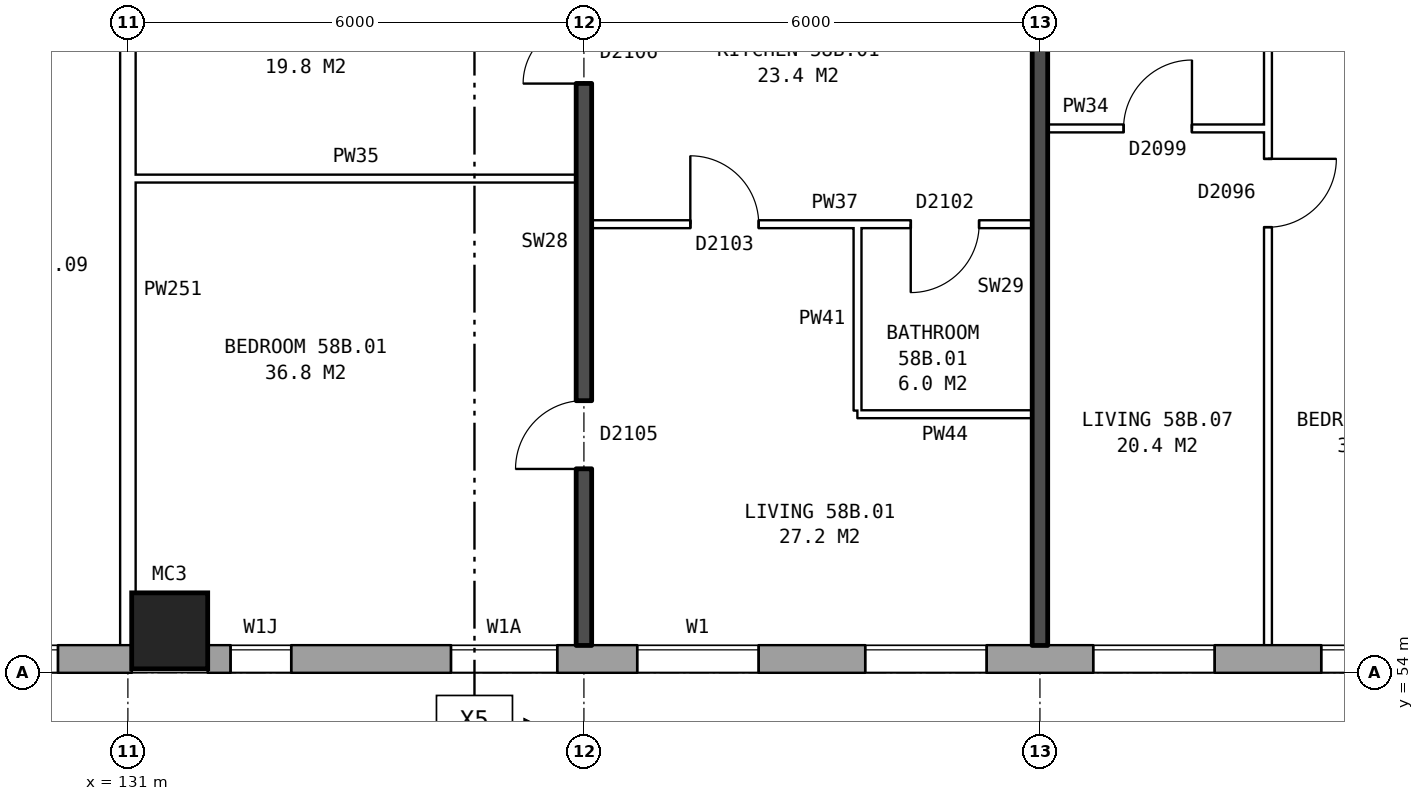
"""IFC4 building model, lengths in metres.
Left out: names, types, materials, properties, quantities, classifications, styles, units other than length and angle.
Written with IfcOpenShell. Run it as: python <this file> out.ifc"""

import sys

from ifc_helpers import new_model, si_unit, direction, frame, frame_2d, origin, origin_2d, place, context, subcontext, project, spatial, rectangle, hollow_rectangle, extrude, element, fill, save


model = new_model("IFC4")
c1 = context("Model", 3, precision=1e-05, world=origin(), true_north=direction((0.0, 1.0)))
c2 = subcontext(c1, "Body", "Model", "MODEL_VIEW")
j1 = project(units=[si_unit("LENGTHUNIT", "METRE"), si_unit("PLANEANGLEUNIT", "RADIAN")], contexts=[c1])
p1 = place(None, origin())
s1 = spatial("IfcSite", under=j1, at=p1, CompositionType="ELEMENT")
p2 = place(p1, origin())
s2 = spatial("IfcBuilding", under=s1, at=p2, CompositionType="ELEMENT")
p3 = place(p2, frame((0.0, 0.0, 205.9)))
s3 = spatial("IfcBuildingStorey", under=s2, at=p3, CompositionType="ELEMENT", Elevation=205.9)
p4 = place(p3, frame((131.55, 54.55, 0.0), z_axis=(0.0, 0.0, 1.0), x_axis=(1.0, 0.0, 0.0)))
e1 = element("IfcColumn", 1, at=p4, inside=s3, PredefinedType="COLUMN", context=c2, shape_type="SweptSolid", body=[
    extrude(hollow_rectangle(XDim=1.0, YDim=1.0, WallThickness=0.055, at=origin_2d()), origin(), (0.0, 0.0, 1.0), 3.1),
])
p5 = place(p3, frame((75.95, 54.18, 0.0), z_axis=(0.0, 0.0, 1.0), x_axis=(1.0, 0.0, 0.0)))
e2 = element("IfcWall", 2, at=p5, inside=s3, PredefinedType="STANDARD", context=c2, shape_type="SweptSolid", body=[
    extrude(rectangle(XDim=55.1, YDim=0.36, at=frame_2d((27.55, 0.0))), origin(), (0.0, 0.0, 1.0), 2.85),
])
p6 = place(p5, frame((0.969, 0.0, 0.8)))
e3 = element("IfcOpeningElement", 3, at=p6, cuts=e2, PredefinedType="OPENING", context=c2, shape_type="SweptSolid", body=[
    extrude(rectangle(XDim=1.6, YDim=1.8, at=frame_2d((0.8, 0.9))), frame((0.0, 0.19, 0.0), z_axis=(0.0, -1.0, 0.0), x_axis=(1.0, 0.0, 0.0)), (0.0, 0.0, 1.0), 0.38),
])
p7 = place(p5, frame((4.406, 0.0, 0.8)))
e4 = element("IfcOpeningElement", 4, at=p7, cuts=e2, PredefinedType="OPENING", context=c2, shape_type="SweptSolid", body=[
    extrude(rectangle(XDim=1.6, YDim=1.8, at=frame_2d((0.8, 0.9))), frame((0.0, 0.19, 0.0), z_axis=(0.0, -1.0, 0.0), x_axis=(1.0, 0.0, 0.0)), (0.0, 0.0, 1.0), 0.38),
])
p8 = place(p5, frame((7.844, 0.0, 0.8)))
e5 = element("IfcOpeningElement", 5, at=p8, cuts=e2, PredefinedType="OPENING", context=c2, shape_type="SweptSolid", body=[
    extrude(rectangle(XDim=1.6, YDim=1.8, at=frame_2d((0.8, 0.9))), frame((0.0, 0.19, 0.0), z_axis=(0.0, -1.0, 0.0), x_axis=(1.0, 0.0, 0.0)), (0.0, 0.0, 1.0), 0.38),
])
p9 = place(p5, frame((11.281, 0.0, 0.8)))
e6 = element("IfcOpeningElement", 6, at=p9, cuts=e2, PredefinedType="OPENING", context=c2, shape_type="SweptSolid", body=[
    extrude(rectangle(XDim=1.6, YDim=1.8, at=frame_2d((0.8, 0.9))), frame((0.0, 0.19, 0.0), z_axis=(0.0, -1.0, 0.0), x_axis=(1.0, 0.0, 0.0)), (0.0, 0.0, 1.0), 0.38),
])
p10 = place(p5, frame((14.719, 0.0, 0.8)))
e7 = element("IfcOpeningElement", 7, at=p10, cuts=e2, PredefinedType="OPENING", context=c2, shape_type="SweptSolid", body=[
    extrude(rectangle(XDim=1.6, YDim=1.8, at=frame_2d((0.8, 0.9))), frame((0.0, 0.19, 0.0), z_axis=(0.0, -1.0, 0.0), x_axis=(1.0, 0.0, 0.0)), (0.0, 0.0, 1.0), 0.38),
])
p11 = place(p5, frame((18.156, 0.0, 0.8)))
e8 = element("IfcOpeningElement", 8, at=p11, cuts=e2, PredefinedType="OPENING", context=c2, shape_type="SweptSolid", body=[
    extrude(rectangle(XDim=1.6, YDim=1.8, at=frame_2d((0.8, 0.9))), frame((0.0, 0.19, 0.0), z_axis=(0.0, -1.0, 0.0), x_axis=(1.0, 0.0, 0.0)), (0.0, 0.0, 1.0), 0.38),
])
p12 = place(p5, frame((21.594, 0.0, 0.8)))
e9 = element("IfcOpeningElement", 9, at=p12, cuts=e2, PredefinedType="OPENING", context=c2, shape_type="SweptSolid", body=[
    extrude(rectangle(XDim=1.6, YDim=1.8, at=frame_2d((0.8, 0.9))), frame((0.0, 0.19, 0.0), z_axis=(0.0, -1.0, 0.0), x_axis=(1.0, 0.0, 0.0)), (0.0, 0.0, 1.0), 0.38),
])
p13 = place(p5, frame((25.031, 0.0, 0.8)))
e10 = element("IfcOpeningElement", 10, at=p13, cuts=e2, PredefinedType="OPENING", context=c2, shape_type="SweptSolid", body=[
    extrude(rectangle(XDim=1.6, YDim=1.8, at=frame_2d((0.8, 0.9))), frame((0.0, 0.19, 0.0), z_axis=(0.0, -1.0, 0.0), x_axis=(1.0, 0.0, 0.0)), (0.0, 0.0, 1.0), 0.38),
])
p14 = place(p5, frame((28.469, 0.0, 0.8)))
e11 = element("IfcOpeningElement", 11, at=p14, cuts=e2, PredefinedType="OPENING", context=c2, shape_type="SweptSolid", body=[
    extrude(rectangle(XDim=1.6, YDim=1.8, at=frame_2d((0.8, 0.9))), frame((0.0, 0.19, 0.0), z_axis=(0.0, -1.0, 0.0), x_axis=(1.0, 0.0, 0.0)), (0.0, 0.0, 1.0), 0.38),
])
p15 = place(p5, frame((31.906, 0.0, 0.8)))
e12 = element("IfcOpeningElement", 12, at=p15, cuts=e2, PredefinedType="OPENING", context=c2, shape_type="SweptSolid", body=[
    extrude(rectangle(XDim=1.6, YDim=1.8, at=frame_2d((0.8, 0.9))), frame((0.0, 0.19, 0.0), z_axis=(0.0, -1.0, 0.0), x_axis=(1.0, 0.0, 0.0)), (0.0, 0.0, 1.0), 0.38),
])
p16 = place(p5, frame((35.344, 0.0, 0.8)))
e13 = element("IfcOpeningElement", 13, at=p16, cuts=e2, PredefinedType="OPENING", context=c2, shape_type="SweptSolid", body=[
    extrude(rectangle(XDim=1.6, YDim=1.8, at=frame_2d((0.8, 0.9))), frame((0.0, 0.19, 0.0), z_axis=(0.0, -1.0, 0.0), x_axis=(1.0, 0.0, 0.0)), (0.0, 0.0, 1.0), 0.38),
])
p17 = place(p5, frame((38.781, 0.0, 0.8)))
e14 = element("IfcOpeningElement", 14, at=p17, cuts=e2, PredefinedType="OPENING", context=c2, shape_type="SweptSolid", body=[
    extrude(rectangle(XDim=1.6, YDim=1.8, at=frame_2d((0.8, 0.9))), frame((0.0, 0.19, 0.0), z_axis=(0.0, -1.0, 0.0), x_axis=(1.0, 0.0, 0.0)), (0.0, 0.0, 1.0), 0.38),
])
p18 = place(p5, frame((42.219, 0.0, 0.8)))
e15 = element("IfcOpeningElement", 15, at=p18, cuts=e2, PredefinedType="OPENING", context=c2, shape_type="SweptSolid", body=[
    extrude(rectangle(XDim=1.6, YDim=1.8, at=frame_2d((0.8, 0.9))), frame((0.0, 0.19, 0.0), z_axis=(0.0, -1.0, 0.0), x_axis=(1.0, 0.0, 0.0)), (0.0, 0.0, 1.0), 0.38),
])
p19 = place(p5, frame((45.656, 0.0, 0.8)))
e16 = element("IfcOpeningElement", 16, at=p19, cuts=e2, PredefinedType="OPENING", context=c2, shape_type="SweptSolid", body=[
    extrude(rectangle(XDim=1.6, YDim=1.8, at=frame_2d((0.8, 0.9))), frame((0.0, 0.19, 0.0), z_axis=(0.0, -1.0, 0.0), x_axis=(1.0, 0.0, 0.0)), (0.0, 0.0, 1.0), 0.38),
])
p20 = place(p5, frame((49.094, 0.0, 0.8)))
e17 = element("IfcOpeningElement", 17, at=p20, cuts=e2, PredefinedType="OPENING", context=c2, shape_type="SweptSolid", body=[
    extrude(rectangle(XDim=1.6, YDim=1.8, at=frame_2d((0.8, 0.9))), frame((0.0, 0.19, 0.0), z_axis=(0.0, -1.0, 0.0), x_axis=(1.0, 0.0, 0.0)), (0.0, 0.0, 1.0), 0.38),
])
p21 = place(p5, frame((52.531, 0.0, 0.8)))
e18 = element("IfcOpeningElement", 18, at=p21, cuts=e2, PredefinedType="OPENING", context=c2, shape_type="SweptSolid", body=[
    extrude(rectangle(XDim=1.6, YDim=1.8, at=frame_2d((0.8, 0.9))), frame((0.0, 0.19, 0.0), z_axis=(0.0, -1.0, 0.0), x_axis=(1.0, 0.0, 0.0)), (0.0, 0.0, 1.0), 0.38),
])
p22 = place(p3, frame((132.05, 54.18, 0.0), z_axis=(0.0, 0.0, 1.0), x_axis=(1.0, 0.0, 0.0)))
e19 = element("IfcWall", 19, at=p22, inside=s3, PredefinedType="STANDARD", context=c2, shape_type="SweptSolid", body=[
    extrude(rectangle(XDim=33.875, YDim=0.36, at=frame_2d((16.938, 0.0))), origin(), (0.0, 0.0, 1.0), 2.85),
])
p23 = place(p22, frame((0.3, 0.0, 0.9)))
e20 = element("IfcOpeningElement", 20, at=p23, cuts=e19, PredefinedType="OPENING", context=c2, shape_type="SweptSolid", body=[
    extrude(rectangle(XDim=0.8, YDim=1.5, at=frame_2d((0.4, 0.75))), frame((0.0, 0.19, 0.0), z_axis=(0.0, -1.0, 0.0), x_axis=(1.0, 0.0, 0.0)), (0.0, 0.0, 1.0), 0.38),
])
p24 = place(p22, frame((5.65, 0.0, 0.8)))
e21 = element("IfcOpeningElement", 21, at=p24, cuts=e19, PredefinedType="OPENING", context=c2, shape_type="SweptSolid", body=[
    extrude(rectangle(XDim=1.6, YDim=1.8, at=frame_2d((0.8, 0.9))), frame((0.0, 0.19, 0.0), z_axis=(0.0, -1.0, 0.0), x_axis=(1.0, 0.0, 0.0)), (0.0, 0.0, 1.0), 0.38),
])
p25 = place(p22, frame((8.65, 0.0, 0.8)))
e22 = element("IfcOpeningElement", 22, at=p25, cuts=e19, PredefinedType="OPENING", context=c2, shape_type="SweptSolid", body=[
    extrude(rectangle(XDim=1.6, YDim=1.8, at=frame_2d((0.8, 0.9))), frame((0.0, 0.19, 0.0), z_axis=(0.0, -1.0, 0.0), x_axis=(1.0, 0.0, 0.0)), (0.0, 0.0, 1.0), 0.38),
])
p26 = place(p22, frame((11.65, 0.0, 0.8)))
e23 = element("IfcOpeningElement", 23, at=p26, cuts=e19, PredefinedType="OPENING", context=c2, shape_type="SweptSolid", body=[
    extrude(rectangle(XDim=1.6, YDim=1.8, at=frame_2d((0.8, 0.9))), frame((0.0, 0.19, 0.0), z_axis=(0.0, -1.0, 0.0), x_axis=(1.0, 0.0, 0.0)), (0.0, 0.0, 1.0), 0.38),
])
p27 = place(p22, frame((14.65, 0.0, 0.8)))
e24 = element("IfcOpeningElement", 24, at=p27, cuts=e19, PredefinedType="OPENING", context=c2, shape_type="SweptSolid", body=[
    extrude(rectangle(XDim=1.6, YDim=1.8, at=frame_2d((0.8, 0.9))), frame((0.0, 0.19, 0.0), z_axis=(0.0, -1.0, 0.0), x_axis=(1.0, 0.0, 0.0)), (0.0, 0.0, 1.0), 0.38),
])
p28 = place(p22, frame((17.65, 0.0, 0.8)))
e25 = element("IfcOpeningElement", 25, at=p28, cuts=e19, PredefinedType="OPENING", context=c2, shape_type="SweptSolid", body=[
    extrude(rectangle(XDim=1.6, YDim=1.8, at=frame_2d((0.8, 0.9))), frame((0.0, 0.19, 0.0), z_axis=(0.0, -1.0, 0.0), x_axis=(1.0, 0.0, 0.0)), (0.0, 0.0, 1.0), 0.38),
])
p29 = place(p22, frame((20.65, 0.0, 0.8)))
e26 = element("IfcOpeningElement", 26, at=p29, cuts=e19, PredefinedType="OPENING", context=c2, shape_type="SweptSolid", body=[
    extrude(rectangle(XDim=1.6, YDim=1.8, at=frame_2d((0.8, 0.9))), frame((0.0, 0.19, 0.0), z_axis=(0.0, -1.0, 0.0), x_axis=(1.0, 0.0, 0.0)), (0.0, 0.0, 1.0), 0.38),
])
p30 = place(p22, frame((23.65, 0.0, 0.8)))
e27 = element("IfcOpeningElement", 27, at=p30, cuts=e19, PredefinedType="OPENING", context=c2, shape_type="SweptSolid", body=[
    extrude(rectangle(XDim=1.6, YDim=1.8, at=frame_2d((0.8, 0.9))), frame((0.0, 0.19, 0.0), z_axis=(0.0, -1.0, 0.0), x_axis=(1.0, 0.0, 0.0)), (0.0, 0.0, 1.0), 0.38),
])
p31 = place(p22, frame((26.65, 0.0, 0.8)))
e28 = element("IfcOpeningElement", 28, at=p31, cuts=e19, PredefinedType="OPENING", context=c2, shape_type="SweptSolid", body=[
    extrude(rectangle(XDim=1.6, YDim=1.8, at=frame_2d((0.8, 0.9))), frame((0.0, 0.19, 0.0), z_axis=(0.0, -1.0, 0.0), x_axis=(1.0, 0.0, 0.0)), (0.0, 0.0, 1.0), 0.38),
])
p32 = place(p22, frame((29.65, 0.0, 0.8)))
e29 = element("IfcOpeningElement", 29, at=p32, cuts=e19, PredefinedType="OPENING", context=c2, shape_type="SweptSolid", body=[
    extrude(rectangle(XDim=1.6, YDim=1.8, at=frame_2d((0.8, 0.9))), frame((0.0, 0.19, 0.0), z_axis=(0.0, -1.0, 0.0), x_axis=(1.0, 0.0, 0.0)), (0.0, 0.0, 1.0), 0.38),
])
p33 = place(p22, frame((3.2, 0.0, 0.8)))
e30 = element("IfcOpeningElement", 30, at=p33, cuts=e19, PredefinedType="OPENING", context=c2, shape_type="SweptSolid", body=[
    extrude(rectangle(XDim=1.4, YDim=1.8, at=frame_2d((0.7, 0.9))), frame((0.0, 0.19, 0.0), z_axis=(0.0, -1.0, 0.0), x_axis=(1.0, 0.0, 0.0)), (0.0, 0.0, 1.0), 0.38),
])
p34 = place(p3, frame((140.6, 57.4, 0.0), z_axis=(0.0, 0.0, 1.0), x_axis=(1.0, 0.0, 0.0)))
e31 = element("IfcWall", 31, at=p34, inside=s3, PredefinedType="PARTITIONING", context=c2, shape_type="SweptSolid", body=[
    extrude(rectangle(XDim=2.3, YDim=0.1, at=frame_2d((1.15, 0.0))), origin(), (0.0, 0.0, 1.0), 2.85),
])
p35 = place(p3, frame((137.1, 59.9, 0.0), z_axis=(0.0, 0.0, 1.0), x_axis=(1.0, 0.0, 0.0)))
e32 = element("IfcWall", 32, at=p35, inside=s3, PredefinedType="PARTITIONING", context=c2, shape_type="SweptSolid", body=[
    extrude(rectangle(XDim=5.8, YDim=0.1, at=frame_2d((2.9, 0.0))), origin(), (0.0, 0.0, 1.0), 2.85),
])
p36 = place(p35, frame((1.3, 0.0, 0.0)))
e33 = element("IfcOpeningElement", 33, at=p36, cuts=e32, PredefinedType="OPENING", context=c2, shape_type="SweptSolid", body=[
    extrude(rectangle(XDim=0.9, YDim=2.1, at=frame_2d((0.45, 1.05))), frame((0.0, 0.06, 0.0), z_axis=(0.0, -1.0, 0.0), x_axis=(1.0, 0.0, 0.0)), (0.0, 0.0, 1.0), 0.12),
])
p37 = place(p35, frame((4.2, 0.0, 0.0)))
e34 = element("IfcOpeningElement", 34, at=p37, cuts=e32, PredefinedType="OPENING", context=c2, shape_type="SweptSolid", body=[
    extrude(rectangle(XDim=0.9, YDim=2.1, at=frame_2d((0.45, 1.05))), frame((0.0, 0.06, 0.0), z_axis=(0.0, -1.0, 0.0), x_axis=(1.0, 0.0, 0.0)), (0.0, 0.0, 1.0), 0.12),
])
p38 = place(p3, frame((131.1, 60.5, 0.0), z_axis=(0.0, 0.0, 1.0), x_axis=(1.0, 0.0, 0.0)))
e35 = element("IfcWall", 35, at=p38, inside=s3, PredefinedType="PARTITIONING", context=c2, shape_type="SweptSolid", body=[
    extrude(rectangle(XDim=5.8, YDim=0.1, at=frame_2d((2.9, 0.0))), origin(), (0.0, 0.0, 1.0), 2.85),
])
p39 = place(p3, frame((143.1, 61.16, 0.0), z_axis=(0.0, 0.0, 1.0), x_axis=(1.0, 0.0, 0.0)))
e36 = element("IfcWall", 36, at=p39, inside=s3, PredefinedType="PARTITIONING", context=c2, shape_type="SweptSolid", body=[
    extrude(rectangle(XDim=2.9, YDim=0.1, at=frame_2d((1.45, 0.0))), origin(), (0.0, 0.0, 1.0), 2.85),
])
p40 = place(p39, frame((1.0, 0.0, 0.0)))
e37 = element("IfcOpeningElement", 37, at=p40, cuts=e36, PredefinedType="OPENING", context=c2, shape_type="SweptSolid", body=[
    extrude(rectangle(XDim=0.9, YDim=2.1, at=frame_2d((0.45, 1.05))), frame((0.0, 0.06, 0.0), z_axis=(0.0, -1.0, 0.0), x_axis=(1.0, 0.0, 0.0)), (0.0, 0.0, 1.0), 0.12),
])
p41 = place(p3, frame((131.0, 54.36, 0.0), z_axis=(0.0, 0.0, 1.0), x_axis=(0.0, 1.0, 0.0)))
e38 = element("IfcWall", 38, at=p41, inside=s3, PredefinedType="PARTITIONING", context=c2, shape_type="SweptSolid", body=[
    extrude(rectangle(XDim=9.34, YDim=0.2, at=frame_2d((4.67, 0.0))), origin(), (0.0, 0.0, 1.0), 2.85),
])
p42 = place(p3, frame((137.0, 54.36, 0.0), z_axis=(0.0, 0.0, 1.0), x_axis=(0.0, 1.0, 0.0)))
e39 = element("IfcWall", 39, at=p42, inside=s3, PredefinedType="SOLIDWALL", context=c2, shape_type="SweptSolid", body=[
    extrude(rectangle(XDim=9.44, YDim=0.2, at=frame_2d((4.72, 0.0))), origin(), (0.0, 0.0, 1.0), 2.85),
])
p43 = place(p42, frame((2.32, 0.0, 0.0)))
e40 = element("IfcOpeningElement", 40, at=p43, cuts=e39, PredefinedType="OPENING", context=c2, shape_type="SweptSolid", body=[
    extrude(rectangle(XDim=0.9, YDim=2.1, at=frame_2d((0.45, 1.05))), frame((0.0, 0.11, 0.0), z_axis=(0.0, -1.0, 0.0), x_axis=(1.0, 0.0, 0.0)), (0.0, 0.0, 1.0), 0.22),
])
p44 = place(p42, frame((7.39, 0.0, 0.0)))
e41 = element("IfcOpeningElement", 41, at=p44, cuts=e39, PredefinedType="OPENING", context=c2, shape_type="SweptSolid", body=[
    extrude(rectangle(XDim=0.8, YDim=2.1, at=frame_2d((0.4, 1.05))), frame((0.0, 0.11, 0.0), z_axis=(0.0, -1.0, 0.0), x_axis=(1.0, 0.0, 0.0)), (0.0, 0.0, 1.0), 0.22),
])
p45 = place(p3, frame((140.6, 57.45, 0.0), z_axis=(0.0, 0.0, 1.0), x_axis=(0.0, 1.0, 0.0)))
e42 = element("IfcWall", 42, at=p45, inside=s3, PredefinedType="PARTITIONING", context=c2, shape_type="SweptSolid", body=[
    extrude(rectangle(XDim=2.4, YDim=0.1, at=frame_2d((1.2, 0.0))), origin(), (0.0, 0.0, 1.0), 2.85),
])
p46 = place(p3, frame((143.0, 54.36, 0.0), z_axis=(0.0, 0.0, 1.0), x_axis=(0.0, 1.0, 0.0)))
e43 = element("IfcWall", 43, at=p46, inside=s3, PredefinedType="SOLIDWALL", context=c2, shape_type="SweptSolid", body=[
    extrude(rectangle(XDim=9.44, YDim=0.2, at=frame_2d((4.72, 0.0))), origin(), (0.0, 0.0, 1.0), 2.85),
])
p47 = place(p3, frame((146.0, 54.36, 0.0), z_axis=(0.0, 0.0, 1.0), x_axis=(0.0, 1.0, 0.0)))
e44 = element("IfcWall", 44, at=p47, inside=s3, PredefinedType="PARTITIONING", context=c2, shape_type="SweptSolid", body=[
    extrude(rectangle(XDim=14.34, YDim=0.1, at=frame_2d((7.17, 0.0))), origin(), (0.0, 0.0, 1.0), 2.85),
])
p48 = place(p47, frame((5.5, 0.0, 0.0)))
e45 = element("IfcOpeningElement", 45, at=p48, cuts=e44, PredefinedType="OPENING", context=c2, shape_type="SweptSolid", body=[
    extrude(rectangle(XDim=0.9, YDim=2.1, at=frame_2d((0.45, 1.05))), frame((0.0, 0.06, 0.0), z_axis=(0.0, -1.0, 0.0), x_axis=(1.0, 0.0, 0.0)), (0.0, 0.0, 1.0), 0.12),
])
p49 = place(p47, frame((13.04, 0.0, 0.0)))
e46 = element("IfcOpeningElement", 46, at=p49, cuts=e44, PredefinedType="OPENING", context=c2, shape_type="SweptSolid", body=[
    extrude(rectangle(XDim=0.9, YDim=2.1, at=frame_2d((0.45, 1.05))), frame((0.0, 0.06, 0.0), z_axis=(0.0, -1.0, 0.0), x_axis=(1.0, 0.0, 0.0)), (0.0, 0.0, 1.0), 0.12),
])
p50 = place(p21, origin())
e47 = element("IfcWindow", 47, at=p50, inside=s3, PartitioningType="SINGLE_PANEL", PredefinedType="WINDOW", context=c2, shape_type="SweptSolid", body=[
    extrude(rectangle(XDim=1.6, YDim=1.8, at=frame_2d((0.8, 0.9))), frame((0.0, 0.15, 0.0), z_axis=(0.0, -1.0, 0.0), x_axis=(1.0, 0.0, 0.0)), (0.0, 0.0, 1.0), 0.06),
])
fill(e18, e47)
p51 = place(p23, origin())
e48 = element("IfcWindow", 48, at=p51, inside=s3, PartitioningType="SINGLE_PANEL", PredefinedType="WINDOW", context=c2, shape_type="SweptSolid", body=[
    extrude(rectangle(XDim=0.8, YDim=1.5, at=frame_2d((0.4, 0.75))), frame((0.0, 0.15, 0.0), z_axis=(0.0, -1.0, 0.0), x_axis=(1.0, 0.0, 0.0)), (0.0, 0.0, 1.0), 0.06),
])
fill(e20, e48)
p52 = place(p24, origin())
e49 = element("IfcWindow", 49, at=p52, inside=s3, PartitioningType="SINGLE_PANEL", PredefinedType="WINDOW", context=c2, shape_type="SweptSolid", body=[
    extrude(rectangle(XDim=1.6, YDim=1.8, at=frame_2d((0.8, 0.9))), frame((0.0, 0.15, 0.0), z_axis=(0.0, -1.0, 0.0), x_axis=(1.0, 0.0, 0.0)), (0.0, 0.0, 1.0), 0.06),
])
fill(e21, e49)
p53 = place(p25, origin())
e50 = element("IfcWindow", 50, at=p53, inside=s3, PartitioningType="SINGLE_PANEL", PredefinedType="WINDOW", context=c2, shape_type="SweptSolid", body=[
    extrude(rectangle(XDim=1.6, YDim=1.8, at=frame_2d((0.8, 0.9))), frame((0.0, 0.15, 0.0), z_axis=(0.0, -1.0, 0.0), x_axis=(1.0, 0.0, 0.0)), (0.0, 0.0, 1.0), 0.06),
])
fill(e22, e50)
p54 = place(p26, origin())
e51 = element("IfcWindow", 51, at=p54, inside=s3, PartitioningType="SINGLE_PANEL", PredefinedType="WINDOW", context=c2, shape_type="SweptSolid", body=[
    extrude(rectangle(XDim=1.6, YDim=1.8, at=frame_2d((0.8, 0.9))), frame((0.0, 0.15, 0.0), z_axis=(0.0, -1.0, 0.0), x_axis=(1.0, 0.0, 0.0)), (0.0, 0.0, 1.0), 0.06),
])
fill(e23, e51)
p55 = place(p27, origin())
e52 = element("IfcWindow", 52, at=p55, inside=s3, PartitioningType="SINGLE_PANEL", PredefinedType="WINDOW", context=c2, shape_type="SweptSolid", body=[
    extrude(rectangle(XDim=1.6, YDim=1.8, at=frame_2d((0.8, 0.9))), frame((0.0, 0.15, 0.0), z_axis=(0.0, -1.0, 0.0), x_axis=(1.0, 0.0, 0.0)), (0.0, 0.0, 1.0), 0.06),
])
fill(e24, e52)
p56 = place(p43, origin())
e53 = element("IfcDoor", 53, at=p56, inside=s3, OperationType="SINGLE_SWING_LEFT", PredefinedType="DOOR", context=c2, shape_type="SweptSolid", body=[
    extrude(rectangle(XDim=0.9, YDim=2.1, at=frame_2d((0.45, 1.05))), frame((0.0, 0.025, 0.0), z_axis=(0.0, -1.0, 0.0), x_axis=(1.0, 0.0, 0.0)), (0.0, 0.0, 1.0), 0.05),
])
fill(e40, e53)
p57 = place(p36, origin())
e54 = element("IfcDoor", 54, at=p57, inside=s3, OperationType="SINGLE_SWING_LEFT", PredefinedType="DOOR", context=c2, shape_type="SweptSolid", body=[
    extrude(rectangle(XDim=0.9, YDim=2.1, at=frame_2d((0.45, 1.05))), frame((0.0, 0.025, 0.0), z_axis=(0.0, -1.0, 0.0), x_axis=(1.0, 0.0, 0.0)), (0.0, 0.0, 1.0), 0.05),
])
fill(e33, e54)
p58 = place(p44, origin())
e55 = element("IfcDoor", 55, at=p58, inside=s3, OperationType="SINGLE_SWING_LEFT", PredefinedType="DOOR", context=c2, shape_type="SweptSolid", body=[
    extrude(rectangle(XDim=0.8, YDim=2.1, at=frame_2d((0.4, 1.05))), frame((0.0, 0.025, 0.0), z_axis=(0.0, -1.0, 0.0), x_axis=(1.0, 0.0, 0.0)), (0.0, 0.0, 1.0), 0.05),
])
fill(e41, e55)
p59 = place(p37, frame((0.9, 0.0, 0.0), z_axis=(0.0, 0.0, 1.0), x_axis=(-1.0, 0.0, 0.0)))
e56 = element("IfcDoor", 56, at=p59, inside=s3, OperationType="SINGLE_SWING_RIGHT", PredefinedType="DOOR", context=c2, shape_type="SweptSolid", body=[
    extrude(rectangle(XDim=0.9, YDim=2.1, at=frame_2d((0.45, 1.05))), frame((0.0, 0.025, 0.0), z_axis=(0.0, -1.0, 0.0), x_axis=(1.0, 0.0, 0.0)), (0.0, 0.0, 1.0), 0.05),
])
fill(e34, e56)
p60 = place(p48, frame((0.9, 0.0, 0.0), z_axis=(0.0, 0.0, 1.0), x_axis=(-1.0, 0.0, 0.0)))
e57 = element("IfcDoor", 57, at=p60, inside=s3, OperationType="SINGLE_SWING_LEFT", PredefinedType="DOOR", context=c2, shape_type="SweptSolid", body=[
    extrude(rectangle(XDim=0.9, YDim=2.1, at=frame_2d((0.45, 1.05))), frame((0.0, 0.025, 0.0), z_axis=(0.0, -1.0, 0.0), x_axis=(1.0, 0.0, 0.0)), (0.0, 0.0, 1.0), 0.05),
])
fill(e45, e57)
p61 = place(p40, origin())
e58 = element("IfcDoor", 58, at=p61, inside=s3, OperationType="SINGLE_SWING_RIGHT", PredefinedType="DOOR", context=c2, shape_type="SweptSolid", body=[
    extrude(rectangle(XDim=0.9, YDim=2.1, at=frame_2d((0.45, 1.05))), frame((0.0, 0.025, 0.0), z_axis=(0.0, -1.0, 0.0), x_axis=(1.0, 0.0, 0.0)), (0.0, 0.0, 1.0), 0.05),
])
fill(e37, e58)
p62 = place(p33, origin())
e59 = element("IfcWindow", 59, at=p62, inside=s3, PartitioningType="SINGLE_PANEL", PredefinedType="WINDOW", context=c2, shape_type="SweptSolid", body=[
    extrude(rectangle(XDim=1.4, YDim=1.8, at=frame_2d((0.7, 0.9))), frame((0.0, 0.15, 0.0), z_axis=(0.0, -1.0, 0.0), x_axis=(1.0, 0.0, 0.0)), (0.0, 0.0, 1.0), 0.06),
])
fill(e30, e59)
save(model, sys.argv[1])
